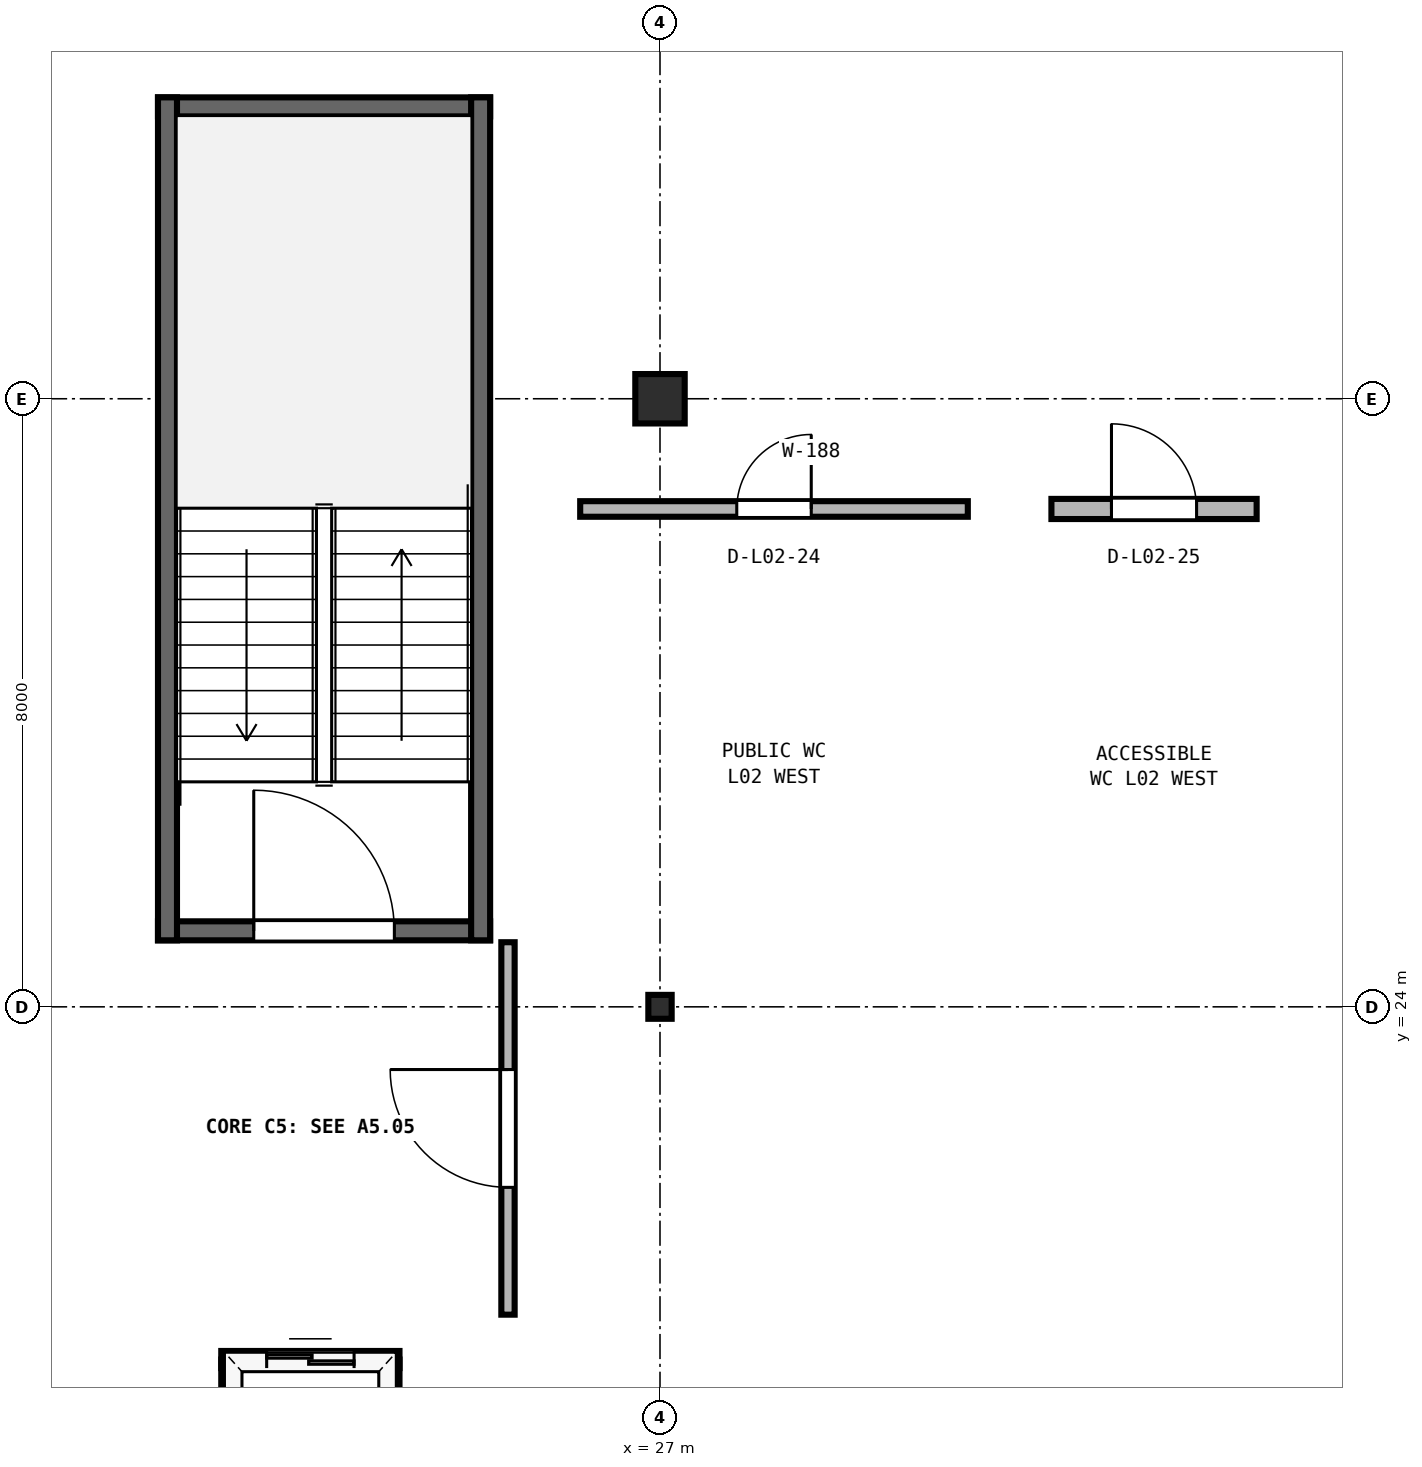
"""IFC4 building model, lengths in metres.
Left out: names, types, materials, properties, quantities, classifications, styles, units other than length and angle.
Written with IfcOpenShell. Run it as: python <this file> out.ifc"""

import sys

from ifc_helpers import new_model, si_unit, direction, frame, frame_2d, origin, origin_2d, place, context, subcontext, project, spatial, rectangle, i_section, extrude, element, fill, save


model = new_model("IFC4")
c1 = context("Model", 3, precision=1e-05, world=origin(), true_north=direction((0.0, 1.0)))
c2 = subcontext(c1, "Body", "Model", "MODEL_VIEW")
j1 = project(units=[si_unit("LENGTHUNIT", "METRE"), si_unit("PLANEANGLEUNIT", "RADIAN")], contexts=[c1])
p1 = place(None, origin())
s1 = spatial("IfcSite", under=j1, at=p1, CompositionType="ELEMENT")
p2 = place(p1, origin())
s2 = spatial("IfcBuilding", under=s1, at=p2, CompositionType="ELEMENT")
p3 = place(p2, frame((0.0, 0.0, 10.2)))
s3 = spatial("IfcBuildingStorey", under=s2, at=p3, CompositionType="ELEMENT", Elevation=10.2)
p4 = place(p3, frame((27.0, 24.0, 0.0), z_axis=(0.0, 0.0, 1.0), x_axis=(1.0, 0.0, 0.0)))
e1 = element("IfcColumn", 1, at=p4, inside=s3, PredefinedType="COLUMN", context=c2, shape_type="SweptSolid", body=[
    extrude(i_section(OverallWidth=0.307, OverallDepth=0.315, WebThickness=0.012, FlangeThickness=0.019, FilletRadius=0.017, at=origin_2d()), origin(), (0.0, 0.0, 1.0), 4.24),
])
p5 = place(p3, frame((27.0, 32.0, 0.0), z_axis=(0.0, 0.0, 1.0), x_axis=(1.0, 0.0, 0.0)))
e2 = element("IfcColumn", 2, at=p5, inside=s3, PredefinedType="COLUMN", context=c2, shape_type="SweptSolid", body=[
    extrude(rectangle(XDim=0.65, YDim=0.65, at=origin_2d()), origin(), (0.0, 0.0, 1.0), 4.24),
])
p6 = place(p3, frame((20.395, 25.0, 0.0), z_axis=(0.0, 0.0, 1.0), x_axis=(1.0, 0.0, 0.0)))
e3 = element("IfcWall", 3, at=p6, inside=s3, PredefinedType="SHEAR", context=c2, shape_type="SweptSolid", body=[
    extrude(rectangle(XDim=4.37, YDim=0.25, at=frame_2d((2.185, 0.0))), origin(), (0.0, 0.0, 1.0), 4.24),
])
p7 = place(p6, frame((1.26, 0.0, 0.0)))
e4 = element("IfcOpeningElement", 4, at=p7, cuts=e3, PredefinedType="OPENING", context=c2, shape_type="SweptSolid", body=[
    extrude(rectangle(XDim=1.85, YDim=2.25, at=frame_2d((0.925, 1.125))), frame((0.0, 0.135, 0.0), z_axis=(0.0, -1.0, 0.0), x_axis=(1.0, 0.0, 0.0)), (0.0, 0.0, 1.0), 0.27),
])
p8 = place(p3, frame((20.395, 35.84, 0.0), z_axis=(0.0, 0.0, 1.0), x_axis=(1.0, 0.0, 0.0)))
e5 = element("IfcWall", 5, at=p8, inside=s3, PredefinedType="SHEAR", context=c2, shape_type="SweptSolid", body=[
    extrude(rectangle(XDim=4.37, YDim=0.25, at=frame_2d((2.185, 0.0))), origin(), (0.0, 0.0, 1.0), 4.24),
])
for number, where, z_axis, x_axis in (
    (6, (20.52, 24.875, 0.0), (0.0, 0.0, 1.0), (0.0, 1.0, 0.0)),
    (7, (24.64, 24.875, 0.0), (0.0, 0.0, 1.0), (0.0, 1.0, 0.0)),
):
    element("IfcWall", number, at=place(p3, frame(where, z_axis=z_axis, x_axis=x_axis)), inside=s3, PredefinedType="SHEAR", context=c2, shape_type="SweptSolid", body=[
        extrude(rectangle(XDim=11.09, YDim=0.25, at=frame_2d((5.545, 0.0))), origin(), (0.0, 0.0, 1.0), 4.24),
    ])
p9 = place(p3, frame((25.0, 19.95, 0.0), z_axis=(0.0, 0.0, 1.0), x_axis=(0.0, 1.0, 0.0)))
e8 = element("IfcWall", 8, at=p9, inside=s3, PredefinedType="PARTITIONING", context=c2, shape_type="SweptSolid", body=[
    extrude(rectangle(XDim=4.9, YDim=0.175, at=frame_2d((2.45, 0.0))), origin(), (0.0, 0.0, 1.0), 4.19),
])
p10 = place(p9, frame((1.675, 0.0, 0.0)))
e9 = element("IfcOpeningElement", 9, at=p10, cuts=e8, PredefinedType="OPENING", context=c2, shape_type="SweptSolid", body=[
    extrude(rectangle(XDim=1.55, YDim=2.22, at=frame_2d((0.775, 1.11))), frame((0.0, 0.097, 0.0), z_axis=(0.0, -1.0, 0.0), x_axis=(1.0, 0.0, 0.0)), (0.0, 0.0, 1.0), 0.195),
])
p11 = place(p3, frame((21.228, 19.36, 0.0), z_axis=(0.0, 0.0, 1.0), x_axis=(1.0, 0.0, 0.0)))
e10 = element("IfcWall", 10, at=p11, inside=s3, PredefinedType="SOLIDWALL", context=c2, shape_type="SweptSolid", body=[
    extrude(rectangle(XDim=2.345, YDim=0.225, at=frame_2d((1.172, 0.0))), origin(), (0.0, 0.0, 1.0), 4.19),
])
p12 = place(p11, frame((0.597, 0.0, 0.0)))
e11 = element("IfcOpeningElement", 11, at=p12, cuts=e10, PredefinedType="OPENING", context=c2, shape_type="SweptSolid", body=[
    extrude(rectangle(XDim=1.15, YDim=2.2, at=frame_2d((0.575, 1.1))), frame((0.0, 0.123, 0.0), z_axis=(0.0, -1.0, 0.0), x_axis=(1.0, 0.0, 0.0)), (0.0, 0.0, 1.0), 0.245),
])
for number, where, z_axis, x_axis in (
    (12, (21.34, 17.04, 0.0), (0.0, 0.0, 1.0), (0.0, 1.0, 0.0)),
    (13, (23.46, 17.04, 0.0), (0.0, 0.0, 1.0), (0.0, 1.0, 0.0)),
):
    element("IfcWall", number, at=place(p3, frame(where, z_axis=z_axis, x_axis=x_axis)), inside=s3, PredefinedType="SOLIDWALL", context=c2, shape_type="SweptSolid", body=[
        extrude(rectangle(XDim=2.32, YDim=0.225, at=frame_2d((1.16, 0.0))), origin(), (0.0, 0.0, 1.0), 4.19),
    ])
p13 = place(p3, frame((25.95, 30.55, 0.0), z_axis=(0.0, 0.0, 1.0), x_axis=(1.0, 0.0, 0.0)))
e14 = element("IfcWall", 14, at=p13, inside=s3, PredefinedType="PLUMBINGWALL", context=c2, shape_type="SweptSolid", body=[
    extrude(rectangle(XDim=5.1, YDim=0.205, at=frame_2d((2.55, 0.0))), origin(), (0.0, 0.0, 1.0), 4.19),
])
p14 = place(p13, frame((2.06, 0.0, 0.0)))
e15 = element("IfcOpeningElement", 15, at=p14, cuts=e14, PredefinedType="OPENING", context=c2, shape_type="SweptSolid", body=[
    extrude(rectangle(XDim=0.98, YDim=2.14, at=frame_2d((0.49, 1.07))), frame((0.0, 0.113, 0.0), z_axis=(0.0, -1.0, 0.0), x_axis=(1.0, 0.0, 0.0)), (0.0, 0.0, 1.0), 0.225),
])
p15 = place(p3, frame((32.15, 30.55, 0.0), z_axis=(0.0, 0.0, 1.0), x_axis=(1.0, 0.0, 0.0)))
e16 = element("IfcWall", 16, at=p15, inside=s3, PredefinedType="PLUMBINGWALL", context=c2, shape_type="SweptSolid", body=[
    extrude(rectangle(XDim=2.7, YDim=0.265, at=frame_2d((1.35, 0.0))), origin(), (0.0, 0.0, 1.0), 4.19),
])
p16 = place(p15, frame((0.79, 0.0, 0.0)))
e17 = element("IfcOpeningElement", 17, at=p16, cuts=e16, PredefinedType="OPENING", context=c2, shape_type="SweptSolid", body=[
    extrude(rectangle(XDim=1.12, YDim=2.16, at=frame_2d((0.56, 1.08))), frame((0.0, 0.142, 0.0), z_axis=(0.0, -1.0, 0.0), x_axis=(1.0, 0.0, 0.0)), (0.0, 0.0, 1.0), 0.285),
])
p17 = place(p7, origin())
e18 = element("IfcDoor", 18, at=p17, inside=s3, OperationType="SINGLE_SWING_LEFT", PredefinedType="DOOR", context=c2, shape_type="SweptSolid", body=[
    extrude(rectangle(XDim=1.85, YDim=2.25, at=frame_2d((0.925, 1.125))), frame((0.0, 0.025, 0.0), z_axis=(0.0, -1.0, 0.0), x_axis=(1.0, 0.0, 0.0)), (0.0, 0.0, 1.0), 0.05),
])
fill(e4, e18)
p18 = place(p10, origin())
e19 = element("IfcDoor", 19, at=p18, inside=s3, OperationType="SINGLE_SWING_RIGHT", PredefinedType="DOOR", context=c2, shape_type="SweptSolid", body=[
    extrude(rectangle(XDim=1.55, YDim=2.22, at=frame_2d((0.775, 1.11))), frame((0.0, 0.025, 0.0), z_axis=(0.0, -1.0, 0.0), x_axis=(1.0, 0.0, 0.0)), (0.0, 0.0, 1.0), 0.05),
])
fill(e9, e19)
p19 = place(p12, origin())
e20 = element("IfcDoor", 20, at=p19, inside=s3, OperationType="DOUBLE_DOOR_SLIDING", PredefinedType="DOOR", context=c2, shape_type="SweptSolid", body=[
    extrude(rectangle(XDim=1.15, YDim=2.2, at=frame_2d((0.575, 1.1))), frame((0.0, 0.025, 0.0), z_axis=(0.0, -1.0, 0.0), x_axis=(1.0, 0.0, 0.0)), (0.0, 0.0, 1.0), 0.05),
])
fill(e11, e20)
p20 = place(p14, origin())
e21 = element("IfcDoor", 21, at=p20, inside=s3, OperationType="SINGLE_SWING_RIGHT", PredefinedType="DOOR", context=c2, shape_type="SweptSolid", body=[
    extrude(rectangle(XDim=0.98, YDim=2.14, at=frame_2d((0.49, 1.07))), frame((0.0, 0.025, 0.0), z_axis=(0.0, -1.0, 0.0), x_axis=(1.0, 0.0, 0.0)), (0.0, 0.0, 1.0), 0.05),
])
fill(e15, e21)
p21 = place(p16, origin())
e22 = element("IfcDoor", 22, at=p21, inside=s3, OperationType="SINGLE_SWING_LEFT", PredefinedType="DOOR", context=c2, shape_type="SweptSolid", body=[
    extrude(rectangle(XDim=1.12, YDim=2.16, at=frame_2d((0.56, 1.08))), frame((0.0, 0.025, 0.0), z_axis=(0.0, -1.0, 0.0), x_axis=(1.0, 0.0, 0.0)), (0.0, 0.0, 1.0), 0.05),
])
fill(e17, e22)
save(model, sys.argv[1])
